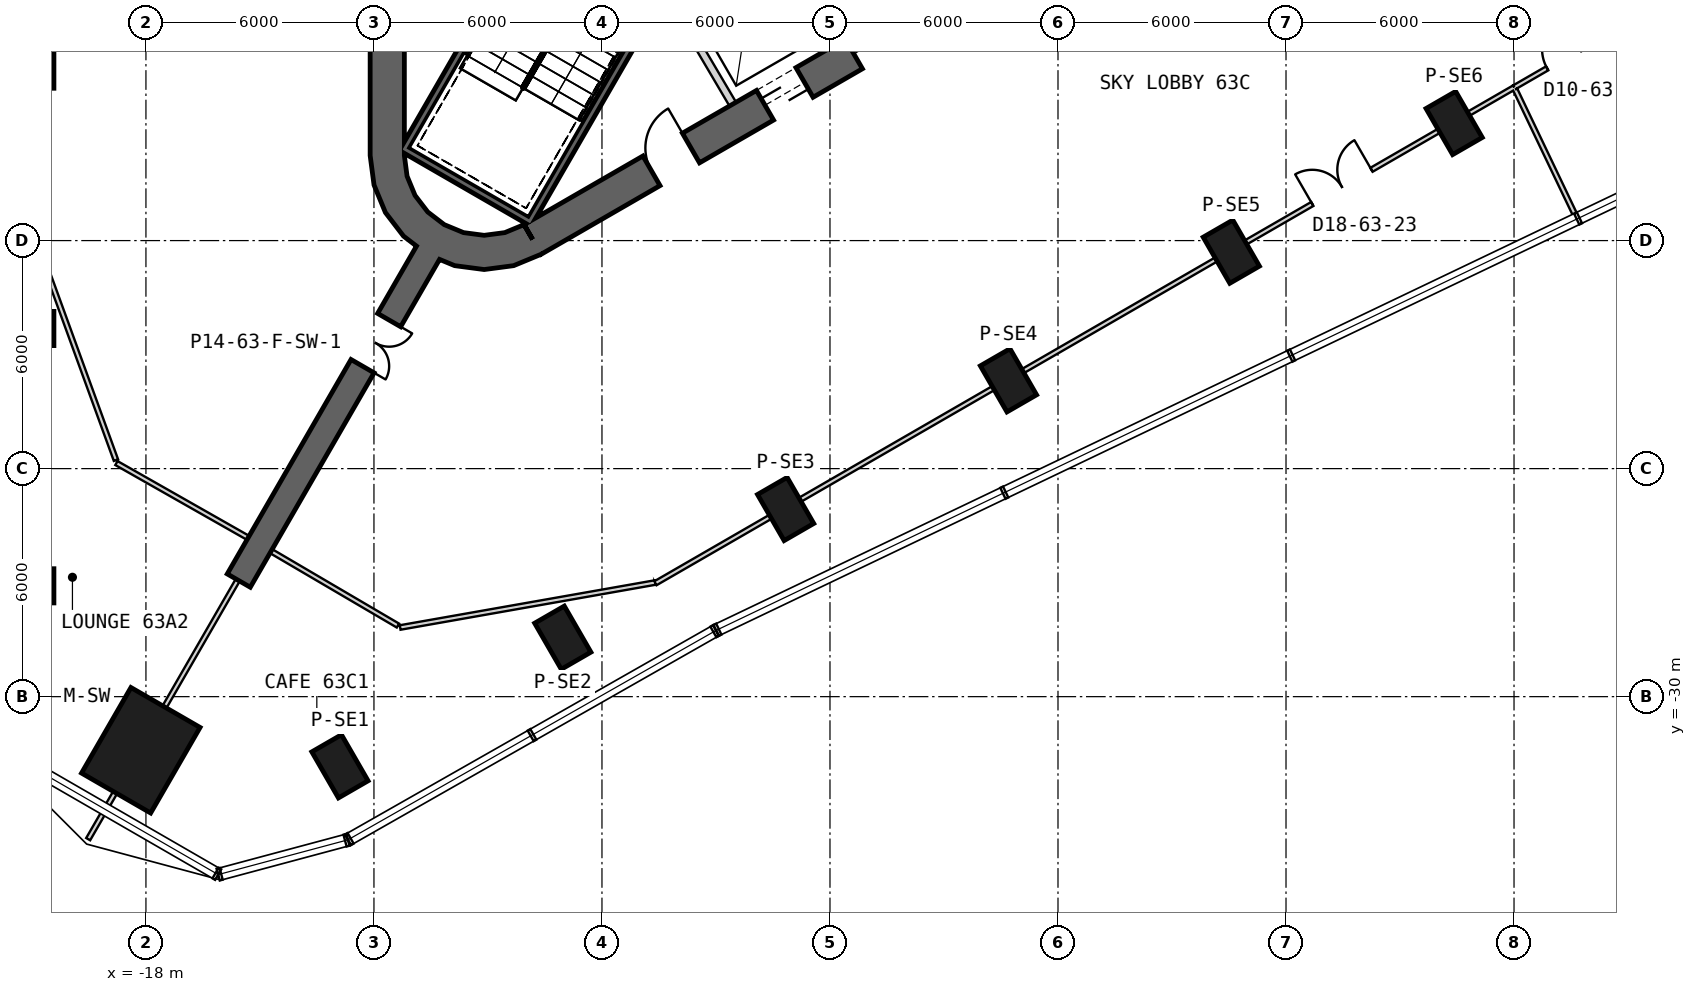
"""IFC4 building model, lengths in metres.
Left out: names, types, materials, properties, quantities, classifications, styles, units other than length and angle.
Written with IfcOpenShell. Run it as: python <this file> out.ifc"""

import sys

from ifc_helpers import new_model, si_unit, direction, frame, frame_2d, origin, origin_2d, place, context, subcontext, project, spatial, polyline, rectangle, outline, extrude, element, fill, save


model = new_model("IFC4")
c1 = context("Model", 3, precision=1e-05, world=origin(), true_north=direction((0.0, 1.0)))
c2 = subcontext(c1, "Body", "Model", "MODEL_VIEW")
j1 = project(units=[si_unit("LENGTHUNIT", "METRE"), si_unit("PLANEANGLEUNIT", "RADIAN")], contexts=[c1])
p1 = place(None, origin())
s1 = spatial("IfcSite", under=j1, at=p1, CompositionType="ELEMENT")
p2 = place(p1, origin())
s2 = spatial("IfcBuilding", under=s1, at=p2, CompositionType="ELEMENT")
p3 = place(p2, frame((0.0, 0.0, 277.2)))
s3 = spatial("IfcBuildingStorey", under=s2, at=p3, CompositionType="ELEMENT", Elevation=277.2)
p4 = place(p3, frame((-18.135, -31.411, 0.0), z_axis=(0.0, 0.0, 1.0), x_axis=(-0.5, -0.866025403784, 0.0)))
e1 = element("IfcColumn", 1, at=p4, inside=s3, PredefinedType="COLUMN", context=c2, shape_type="SweptSolid", body=[
    extrude(rectangle(XDim=2.6, YDim=2.1, at=origin_2d()), origin(), (0.0, 0.0, 1.0), 6.5),
])
for number, where, z_axis, x_axis in (
    (2, (-21.121, -13.542, 0.0), (0.0, 0.0, 1.0), (-1.0, 0.0, 0.0)),
    (3, (-21.121, -20.313, 0.0), (0.0, 0.0, 1.0), (-1.0, 0.0, 0.0)),
    (4, (-21.121, -27.084, 0.0), (0.0, 0.0, 1.0), (-1.0, 0.0, 0.0)),
    (5, (-12.895, -31.833, 0.0), (0.0, 0.0, 1.0), (0.5, -0.866, 0.0)),
    (6, (-7.031, -28.448, 0.0), (0.0, 0.0, 1.0), (0.5, -0.866, 0.0)),
    (7, (-1.167, -25.063, 0.0), (0.0, 0.0, 1.0), (0.5, -0.866, 0.0)),
    (8, (4.697, -21.677, 0.0), (0.0, 0.0, 1.0), (0.5, -0.866, 0.0)),
    (9, (10.561, -18.292, 0.0), (0.0, 0.0, 1.0), (0.5, -0.866, 0.0)),
    (10, (16.425, -14.906, 0.0), (0.0, 0.0, 1.0), (0.5, -0.866, 0.0)),
):
    element("IfcColumn", number, at=place(p3, frame(where, z_axis=z_axis, x_axis=x_axis)), inside=s3, PredefinedType="COLUMN", context=c2, shape_type="SweptSolid", body=[
        extrude(rectangle(XDim=1.4, YDim=0.9, at=origin_2d()), origin(), (0.0, 0.0, 1.0), 6.5),
    ])
p5 = place(p3, frame((-11.65, 15.762, 0.0), z_axis=(0.0, 0.0, 1.0), x_axis=(0.0, -1.0, 0.0)))
e11 = element("IfcWall", 11, at=p5, inside=s3, PredefinedType="SHEAR", context=c2, shape_type="SweptSolid", body=[
    extrude(rectangle(XDim=31.523, YDim=0.9, at=frame_2d((15.762, 0.0))), origin(), (0.0, 0.0, 1.0), 6.5),
])
p6 = place(p5, frame((7.062, 0.0, 0.0)))
e12 = element("IfcOpeningElement", 12, at=p6, cuts=e11, PredefinedType="OPENING", context=c2, shape_type="SweptSolid", body=[
    extrude(rectangle(XDim=1.2, YDim=2.4, at=frame_2d((0.6, 1.2))), frame((0.0, 0.46, 0.0), z_axis=(0.0, -1.0, 0.0), x_axis=(1.0, 0.0, 0.0)), (0.0, 0.0, 1.0), 0.92),
])
p7 = place(p5, frame((9.762, 0.0, 0.0)))
e13 = element("IfcOpeningElement", 13, at=p7, cuts=e11, PredefinedType="OPENING", context=c2, shape_type="SweptSolid", body=[
    extrude(rectangle(XDim=1.2, YDim=2.4, at=frame_2d((0.6, 1.2))), frame((0.0, 0.46, 0.0), z_axis=(0.0, -1.0, 0.0), x_axis=(1.0, 0.0, 0.0)), (0.0, 0.0, 1.0), 0.92),
])
p8 = place(p5, frame((12.462, 0.0, 0.0)))
e14 = element("IfcOpeningElement", 14, at=p8, cuts=e11, PredefinedType="OPENING", context=c2, shape_type="SweptSolid", body=[
    extrude(rectangle(XDim=1.2, YDim=2.4, at=frame_2d((0.6, 1.2))), frame((0.0, 0.46, 0.0), z_axis=(0.0, -1.0, 0.0), x_axis=(1.0, 0.0, 0.0)), (0.0, 0.0, 1.0), 0.92),
])
p9 = place(p5, frame((15.162, 0.0, 0.0)))
e15 = element("IfcOpeningElement", 15, at=p9, cuts=e11, PredefinedType="OPENING", context=c2, shape_type="SweptSolid", body=[
    extrude(rectangle(XDim=1.2, YDim=2.4, at=frame_2d((0.6, 1.2))), frame((0.0, 0.46, 0.0), z_axis=(0.0, -1.0, 0.0), x_axis=(1.0, 0.0, 0.0)), (0.0, 0.0, 1.0), 0.92),
])
p10 = place(p5, frame((17.862, 0.0, 0.0)))
e16 = element("IfcOpeningElement", 16, at=p10, cuts=e11, PredefinedType="OPENING", context=c2, shape_type="SweptSolid", body=[
    extrude(rectangle(XDim=1.2, YDim=2.4, at=frame_2d((0.6, 1.2))), frame((0.0, 0.46, 0.0), z_axis=(0.0, -1.0, 0.0), x_axis=(1.0, 0.0, 0.0)), (0.0, 0.0, 1.0), 0.92),
])
p11 = place(p5, frame((20.562, 0.0, 0.0)))
e17 = element("IfcOpeningElement", 17, at=p11, cuts=e11, PredefinedType="OPENING", context=c2, shape_type="SweptSolid", body=[
    extrude(rectangle(XDim=1.2, YDim=2.4, at=frame_2d((0.6, 1.2))), frame((0.0, 0.46, 0.0), z_axis=(0.0, -1.0, 0.0), x_axis=(1.0, 0.0, 0.0)), (0.0, 0.0, 1.0), 0.92),
])
p12 = place(p5, frame((23.262, 0.0, 0.0)))
e18 = element("IfcOpeningElement", 18, at=p12, cuts=e11, PredefinedType="OPENING", context=c2, shape_type="SweptSolid", body=[
    extrude(rectangle(XDim=1.2, YDim=2.4, at=frame_2d((0.6, 1.2))), frame((0.0, 0.46, 0.0), z_axis=(0.0, -1.0, 0.0), x_axis=(1.0, 0.0, 0.0)), (0.0, 0.0, 1.0), 0.92),
])
p13 = place(p5, frame((3.612, 0.0, 0.0)))
e19 = element("IfcOpeningElement", 19, at=p13, cuts=e11, PredefinedType="OPENING", context=c2, shape_type="SweptSolid", body=[
    extrude(rectangle(XDim=1.2, YDim=2.4, at=frame_2d((0.6, 1.2))), frame((0.0, 0.46, 0.0), z_axis=(0.0, -1.0, 0.0), x_axis=(1.0, 0.0, 0.0)), (0.0, 0.0, 1.0), 0.92),
])
p14 = place(p5, frame((26.712, 0.0, 0.0)))
e20 = element("IfcOpeningElement", 20, at=p14, cuts=e11, PredefinedType="OPENING", context=c2, shape_type="SweptSolid", body=[
    extrude(rectangle(XDim=1.2, YDim=2.4, at=frame_2d((0.6, 1.2))), frame((0.0, 0.46, 0.0), z_axis=(0.0, -1.0, 0.0), x_axis=(1.0, 0.0, 0.0)), (0.0, 0.0, 1.0), 0.92),
])
p15 = place(p3, frame((-7.825, -17.97, 0.0), z_axis=(0.0, 0.0, 1.0), x_axis=(0.866028369851, 0.499994862586, 0.0)))
e21 = element("IfcWall", 21, at=p15, inside=s3, PredefinedType="SHEAR", context=c2, shape_type="SweptSolid", body=[
    extrude(rectangle(XDim=31.523, YDim=0.9, at=frame_2d((15.762, 0.0))), origin(), (0.0, 0.0, 1.0), 6.5),
])
p16 = place(p15, frame((7.062, 0.0, 0.0)))
e22 = element("IfcOpeningElement", 22, at=p16, cuts=e21, PredefinedType="OPENING", context=c2, shape_type="SweptSolid", body=[
    extrude(rectangle(XDim=1.2, YDim=2.4, at=frame_2d((0.6, 1.2))), frame((0.0, 0.46, 0.0), z_axis=(0.0, -1.0, 0.0), x_axis=(1.0, 0.0, 0.0)), (0.0, 0.0, 1.0), 0.92),
])
p17 = place(p15, frame((9.762, 0.0, 0.0)))
e23 = element("IfcOpeningElement", 23, at=p17, cuts=e21, PredefinedType="OPENING", context=c2, shape_type="SweptSolid", body=[
    extrude(rectangle(XDim=1.2, YDim=2.4, at=frame_2d((0.6, 1.2))), frame((0.0, 0.46, 0.0), z_axis=(0.0, -1.0, 0.0), x_axis=(1.0, 0.0, 0.0)), (0.0, 0.0, 1.0), 0.92),
])
p18 = place(p15, frame((12.462, 0.0, 0.0)))
e24 = element("IfcOpeningElement", 24, at=p18, cuts=e21, PredefinedType="OPENING", context=c2, shape_type="SweptSolid", body=[
    extrude(rectangle(XDim=1.2, YDim=2.4, at=frame_2d((0.6, 1.2))), frame((0.0, 0.46, 0.0), z_axis=(0.0, -1.0, 0.0), x_axis=(1.0, 0.0, 0.0)), (0.0, 0.0, 1.0), 0.92),
])
p19 = place(p15, frame((15.162, 0.0, 0.0)))
e25 = element("IfcOpeningElement", 25, at=p19, cuts=e21, PredefinedType="OPENING", context=c2, shape_type="SweptSolid", body=[
    extrude(rectangle(XDim=1.2, YDim=2.4, at=frame_2d((0.6, 1.2))), frame((0.0, 0.46, 0.0), z_axis=(0.0, -1.0, 0.0), x_axis=(1.0, 0.0, 0.0)), (0.0, 0.0, 1.0), 0.92),
])
p20 = place(p15, frame((17.862, 0.0, 0.0)))
e26 = element("IfcOpeningElement", 26, at=p20, cuts=e21, PredefinedType="OPENING", context=c2, shape_type="SweptSolid", body=[
    extrude(rectangle(XDim=1.2, YDim=2.4, at=frame_2d((0.6, 1.2))), frame((0.0, 0.46, 0.0), z_axis=(0.0, -1.0, 0.0), x_axis=(1.0, 0.0, 0.0)), (0.0, 0.0, 1.0), 0.92),
])
p21 = place(p15, frame((20.562, 0.0, 0.0)))
e27 = element("IfcOpeningElement", 27, at=p21, cuts=e21, PredefinedType="OPENING", context=c2, shape_type="SweptSolid", body=[
    extrude(rectangle(XDim=1.2, YDim=2.4, at=frame_2d((0.6, 1.2))), frame((0.0, 0.46, 0.0), z_axis=(0.0, -1.0, 0.0), x_axis=(1.0, 0.0, 0.0)), (0.0, 0.0, 1.0), 0.92),
])
p22 = place(p15, frame((26.712, 0.0, 0.0)))
e28 = element("IfcOpeningElement", 28, at=p22, cuts=e21, PredefinedType="OPENING", context=c2, shape_type="SweptSolid", body=[
    extrude(rectangle(XDim=1.2, YDim=2.4, at=frame_2d((0.6, 1.2))), frame((0.0, 0.46, 0.0), z_axis=(0.0, -1.0, 0.0), x_axis=(1.0, 0.0, 0.0)), (0.0, 0.0, 1.0), 0.92),
])
p23 = place(p15, frame((3.612, 0.0, 0.0)))
e29 = element("IfcOpeningElement", 29, at=p23, cuts=e21, PredefinedType="OPENING", context=c2, shape_type="SweptSolid", body=[
    extrude(rectangle(XDim=1.2, YDim=2.4, at=frame_2d((0.6, 1.2))), frame((0.0, 0.46, 0.0), z_axis=(0.0, -1.0, 0.0), x_axis=(1.0, 0.0, 0.0)), (0.0, 0.0, 1.0), 0.92),
])
p24 = place(p3, origin())
e30 = element("IfcWall", 30, at=p24, inside=s3, PredefinedType="SHEAR", context=c2, shape_type="SweptSolid", body=[
    extrude(outline(polyline([(-12.1, -15.762), (-11.998, -16.538), (-11.698, -17.262), (-11.221, -17.883), (-10.6, -18.36), (-9.876, -18.659), (-9.1, -18.762), (-8.323, -18.659), (-7.6, -18.36), (-8.05, -17.58), (-8.556, -17.79), (-9.1, -17.862), (-9.644, -17.79), (-10.15, -17.58), (-10.585, -17.247), (-10.919, -16.812), (-11.128, -16.305), (-11.2, -15.762), (-12.1, -15.762)])), origin(), (0.0, 0.0, 1.0), 6.5),
])
p25 = place(p3, frame((-10.575, -18.316, 0.0), z_axis=(0.0, 0.0, 1.0), x_axis=(-0.500007350791, -0.866021159762, 0.0)))
e31 = element("IfcWall", 31, at=p25, inside=s3, PredefinedType="SHEAR", context=c2, shape_type="SweptSolid", body=[
    extrude(rectangle(XDim=9.965, YDim=0.7, at=frame_2d((4.982, 0.0))), origin(), (0.0, 0.0, 1.0), 6.5),
])
p26 = place(p25, frame((2.05, 0.0, 0.0)))
e32 = element("IfcOpeningElement", 32, at=p26, cuts=e31, PredefinedType="OPENING", context=c2, shape_type="SweptSolid", body=[
    extrude(rectangle(XDim=1.4, YDim=2.4, at=frame_2d((0.7, 1.2))), frame((0.0, 0.36, 0.0), z_axis=(0.0, -1.0, 0.0), x_axis=(1.0, 0.0, 0.0)), (0.0, 0.0, 1.0), 0.72),
])
p27 = place(p3, frame((-2.558, -14.409, 0.0), z_axis=(0.0, 0.0, 1.0), x_axis=(-0.507997497166, 0.861358544901, 0.0)))
e33 = element("IfcWall", 33, at=p27, inside=s3, PredefinedType="PLUMBINGWALL", context=c2, shape_type="SweptSolid", body=[
    extrude(rectangle(XDim=3.35, YDim=0.2, at=frame_2d((1.675, 0.0))), origin(), (0.0, 0.0, 1.0), 6.1),
])
p28 = place(p3, frame((-3.905, -10.563, -0.35), z_axis=(0.0, 0.0, 1.0), x_axis=(-0.500012932018, -0.866017937352, 0.0)))
e34 = element("IfcWall", 34, at=p28, inside=s3, PredefinedType="SHEAR", context=c2, shape_type="SweptSolid", body=[
    extrude(rectangle(XDim=8.1, YDim=0.2, at=frame_2d((4.05, 0.0))), origin(), (0.0, 0.0, 1.0), 6.45),
])
p29 = place(p3, frame((-11.282, -15.541, -0.35), z_axis=(0.0, 0.0, 1.0), x_axis=(0.866000483506, -0.500043160704, 0.0)))
e35 = element("IfcWall", 35, at=p29, inside=s3, PredefinedType="SHEAR", context=c2, shape_type="SweptSolid", body=[
    extrude(rectangle(XDim=3.8, YDim=0.2, at=frame_2d((1.9, 0.0))), origin(), (0.0, 0.0, 1.0), 6.45),
])
p30 = place(p3, frame((-7.196, -8.663, -0.35), z_axis=(0.0, 0.0, 1.0), x_axis=(-0.499997992926, -0.866026562566, 0.0)))
e36 = element("IfcWall", 36, at=p30, inside=s3, PredefinedType="SHEAR", context=c2, shape_type="SweptSolid", body=[
    extrude(rectangle(XDim=7.9, YDim=0.2, at=frame_2d((3.95, 0.0))), origin(), (0.0, 0.0, 1.0), 6.45),
])
p31 = place(p3, frame((-18.776, -23.854, 0.0), z_axis=(0.0, 0.0, 1.0), x_axis=(0.869466128771, -0.493992561603, 0.0)))
e37 = element("IfcWall", 37, at=p31, inside=s3, PredefinedType="PARTITIONING", context=c2, shape_type="SweptSolid", body=[
    extrude(rectangle(XDim=3.984, YDim=0.12, at=frame_2d((1.992, 0.0))), origin(), (0.0, 0.0, 1.0), 5.28),
])
p32 = place(p3, frame((-21.121, -17.372, 0.0), z_axis=(0.0, 0.0, 1.0), x_axis=(0.342021948339, -0.939691963813, 0.0)))
e38 = element("IfcWall", 38, at=p32, inside=s3, PredefinedType="PARTITIONING", context=c2, shape_type="SweptSolid", body=[
    extrude(rectangle(XDim=6.818, YDim=0.12, at=frame_2d((3.409, 0.0))), origin(), (0.0, 0.0, 1.0), 5.38),
])
p33 = place(p3, frame((-19.52, -33.75, 0.0), z_axis=(0.0, 0.0, 1.0), x_axis=(0.50006528296, 0.865987709369, 0.0)))
e39 = element("IfcWall", 39, at=p33, inside=s3, PredefinedType="PARTITIONING", context=c2, shape_type="SweptSolid", body=[
    extrude(rectangle(XDim=1.418, YDim=0.12, at=frame_2d((0.709, 0.0))), origin(), (0.0, 0.0, 1.0), 6.1),
])
p34 = place(p3, frame((-17.511, -30.27, 0.0), z_axis=(0.0, 0.0, 1.0), x_axis=(0.499980071345, 0.866036909293, 0.0)))
e40 = element("IfcWall", 40, at=p34, inside=s3, PredefinedType="PARTITIONING", context=c2, shape_type="SweptSolid", body=[
    extrude(rectangle(XDim=3.856, YDim=0.12, at=frame_2d((1.928, 0.0))), origin(), (0.0, 0.0, 1.0), 5.67),
])
p35 = place(p3, frame((-4.595, -27.017, 0.0), z_axis=(0.0, 0.0, 1.0), x_axis=(0.866023879948, 0.500002639353, 0.0)))
e41 = element("IfcWall", 41, at=p35, inside=s3, PredefinedType="PARTITIONING", context=c2, shape_type="SweptSolid", body=[
    extrude(rectangle(XDim=26.097, YDim=0.12, at=frame_2d((13.049, 0.0))), origin(), (0.0, 0.0, 1.0), 6.1),
])
p36 = place(p35, frame((19.96, 0.0, 0.0)))
e42 = element("IfcOpeningElement", 42, at=p36, cuts=e41, PredefinedType="OPENING", context=c2, shape_type="SweptSolid", body=[
    extrude(rectangle(XDim=1.8, YDim=2.1, at=frame_2d((0.9, 1.05))), frame((0.0, 0.07, 0.0), z_axis=(0.0, -1.0, 0.0), x_axis=(1.0, 0.0, 0.0)), (0.0, 0.0, 1.0), 0.14),
])
p37 = place(p3, frame((18.006, -13.968, 0.0), z_axis=(0.0, 0.0, 1.0), x_axis=(0.866026830048, 0.499997529631, 0.0)))
e43 = element("IfcWall", 43, at=p37, inside=s3, PredefinedType="PARTITIONING", context=c2, shape_type="SweptSolid", body=[
    extrude(rectangle(XDim=8.758, YDim=0.12, at=frame_2d((4.379, 0.0))), origin(), (0.0, 0.0, 1.0), 6.1),
])
p38 = place(p37, frame((1.0, 0.0, 0.0)))
e44 = element("IfcOpeningElement", 44, at=p38, cuts=e43, PredefinedType="OPENING", context=c2, shape_type="SweptSolid", body=[
    extrude(rectangle(XDim=1.0, YDim=2.1, at=frame_2d((0.5, 1.05))), frame((0.0, 0.07, 0.0), z_axis=(0.0, -1.0, 0.0), x_axis=(1.0, 0.0, 0.0)), (0.0, 0.0, 1.0), 0.14),
])
p39 = place(p3, frame((-11.311, -28.18, 0.0), z_axis=(0.0, 0.0, 1.0), x_axis=(0.984809524805, 0.173638129032, 0.0)))
e45 = element("IfcWall", 45, at=p39, inside=s3, PredefinedType="PARTITIONING", context=c2, shape_type="SweptSolid", body=[
    extrude(rectangle(XDim=6.812, YDim=0.12, at=frame_2d((3.406, 0.0))), origin(), (0.0, 0.0, 1.0), 5.28),
])
p40 = place(p3, frame((-14.706, -26.172, 0.0), z_axis=(0.0, 0.0, 1.0), x_axis=(0.862517562179, -0.506027128652, 0.0)))
e46 = element("IfcWall", 46, at=p40, inside=s3, PredefinedType="PARTITIONING", context=c2, shape_type="SweptSolid", body=[
    extrude(rectangle(XDim=3.869, YDim=0.12, at=frame_2d((1.935, 0.0))), origin(), (0.0, 0.0, 1.0), 5.28),
])
p41 = place(p3, frame((19.658, -17.43, 0.0), z_axis=(0.0, 0.0, 1.0), x_axis=(-0.431155702596, 0.902277540516, 0.0)))
e47 = element("IfcWall", 47, at=p41, inside=s3, PredefinedType="PARTITIONING", context=c2, shape_type="SweptSolid", body=[
    extrude(rectangle(XDim=3.775, YDim=0.12, at=frame_2d((1.888, 0.0))), origin(), (0.0, 0.0, 1.0), 6.1),
])
p42 = place(p36, origin())
e48 = element("IfcDoor", 48, at=p42, inside=s3, OperationType="DOUBLE_DOOR_SINGLE_SWING", PredefinedType="NOTDEFINED", context=c2, shape_type="SweptSolid", body=[
    extrude(rectangle(XDim=1.8, YDim=2.1, at=frame_2d((0.9, 1.05))), frame((0.0, 0.025, 0.0), z_axis=(0.0, -1.0, 0.0), x_axis=(1.0, 0.0, 0.0)), (0.0, 0.0, 1.0), 0.05),
])
fill(e42, e48)
p43 = place(p38, origin())
e49 = element("IfcDoor", 49, at=p43, inside=s3, OperationType="SINGLE_SWING_RIGHT", PredefinedType="NOTDEFINED", context=c2, shape_type="SweptSolid", body=[
    extrude(rectangle(XDim=1.0, YDim=2.1, at=frame_2d((0.5, 1.05))), frame((0.0, 0.025, 0.0), z_axis=(0.0, -1.0, 0.0), x_axis=(1.0, 0.0, 0.0)), (0.0, 0.0, 1.0), 0.05),
])
fill(e44, e49)
p44 = place(p16, origin())
e50 = element("IfcDoor", 50, at=p44, inside=s3, OperationType="SLIDING_TO_LEFT", PredefinedType="USERDEFINED", context=c2, shape_type="SweptSolid", body=[
    extrude(rectangle(XDim=1.2, YDim=2.4, at=frame_2d((0.6, 1.2))), frame((0.0, 0.025, 0.0), z_axis=(0.0, -1.0, 0.0), x_axis=(1.0, 0.0, 0.0)), (0.0, 0.0, 1.0), 0.05),
])
fill(e22, e50)
p45 = place(p17, origin())
e51 = element("IfcDoor", 51, at=p45, inside=s3, OperationType="SLIDING_TO_LEFT", PredefinedType="USERDEFINED", context=c2, shape_type="SweptSolid", body=[
    extrude(rectangle(XDim=1.2, YDim=2.4, at=frame_2d((0.6, 1.2))), frame((0.0, 0.025, 0.0), z_axis=(0.0, -1.0, 0.0), x_axis=(1.0, 0.0, 0.0)), (0.0, 0.0, 1.0), 0.05),
])
fill(e23, e51)
p46 = place(p23, origin())
e52 = element("IfcDoor", 52, at=p46, inside=s3, OperationType="SINGLE_SWING_RIGHT", PredefinedType="USERDEFINED", context=c2, shape_type="SweptSolid", body=[
    extrude(rectangle(XDim=1.2, YDim=2.4, at=frame_2d((0.6, 1.2))), frame((0.0, 0.025, 0.0), z_axis=(0.0, -1.0, 0.0), x_axis=(1.0, 0.0, 0.0)), (0.0, 0.0, 1.0), 0.05),
])
fill(e29, e52)
p47 = place(p26, origin())
e53 = element("IfcDoor", 53, at=p47, inside=s3, OperationType="DOUBLE_DOOR_SINGLE_SWING", PredefinedType="NOTDEFINED", context=c2, shape_type="SweptSolid", body=[
    extrude(rectangle(XDim=1.4, YDim=2.4, at=frame_2d((0.7, 1.2))), frame((0.0, 0.025, 0.0), z_axis=(0.0, -1.0, 0.0), x_axis=(1.0, 0.0, 0.0)), (0.0, 0.0, 1.0), 0.05),
])
fill(e32, e53)
save(model, sys.argv[1])
